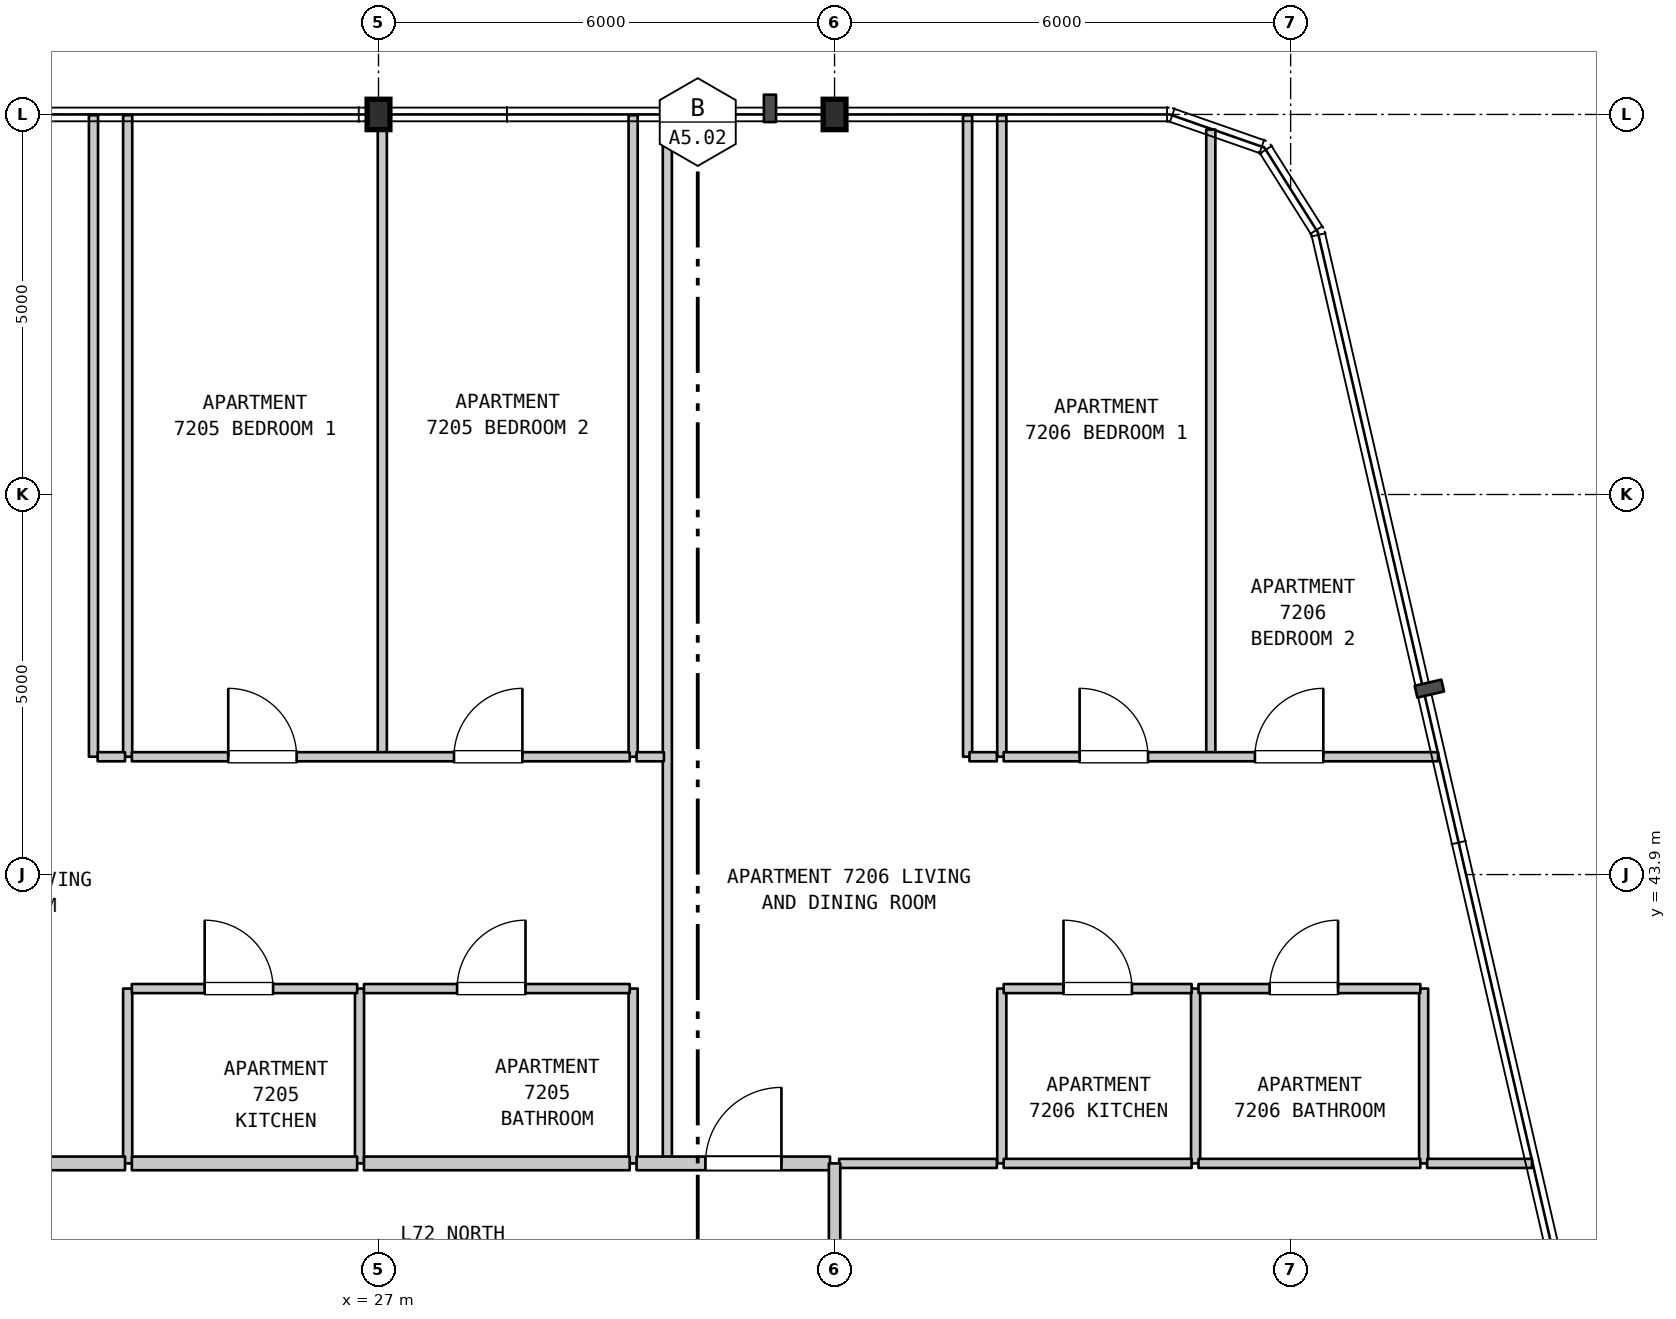
"""IFC4 building model, lengths in metres.
Left out: names, types, materials, properties, quantities, classifications, styles, units other than length and angle.
Written with IfcOpenShell. Run it as: python <this file> out.ifc"""

import sys

from ifc_helpers import new_model, si_unit, direction, frame, frame_2d, origin, origin_2d, place, context, subcontext, project, spatial, rectangle, i_section, extrude, element, fill, save


model = new_model("IFC4")
c1 = context("Model", 3, precision=1e-05, world=origin(), true_north=direction((0.0, 1.0)))
c2 = subcontext(c1, "Body", "Model", "MODEL_VIEW")
j1 = project(units=[si_unit("LENGTHUNIT", "METRE"), si_unit("PLANEANGLEUNIT", "RADIAN")], contexts=[c1])
p1 = place(None, origin())
s1 = spatial("IfcSite", under=j1, at=p1, CompositionType="ELEMENT")
p2 = place(p1, origin())
s2 = spatial("IfcBuilding", under=s1, at=p2, CompositionType="ELEMENT")
p3 = place(p2, frame((0.0, 0.0, 288.0)))
s3 = spatial("IfcBuildingStorey", under=s2, at=p3, CompositionType="ELEMENT", Elevation=288.0)
for number, where, z_axis, x_axis in (
    (1, (27.0, 53.9, 0.0), (0.0, 0.0, 1.0), (1.0, 0.0, 0.0)),
    (2, (33.0, 53.9, 0.0), (0.0, 0.0, 1.0), (1.0, 0.0, 0.0)),
):
    element("IfcColumn", number, at=place(p3, frame(where, z_axis=z_axis, x_axis=x_axis)), inside=s3, PredefinedType="COLUMN", context=c2, shape_type="SweptSolid", body=[
        extrude(i_section(OverallWidth=0.3, OverallDepth=0.4, WebThickness=0.013, FlangeThickness=0.024, FilletRadius=0.027, at=origin_2d()), origin(), (0.0, 0.0, 1.0), 3.7),
    ])
p4 = place(p3, frame((23.25, 45.45, 0.0), z_axis=(0.0, 0.0, 1.0), x_axis=(0.0, 1.0, 0.0)))
e3 = element("IfcWall", 3, at=p4, inside=s3, PredefinedType="PARTITIONING", context=c2, shape_type="SweptSolid", body=[
    extrude(rectangle(XDim=8.44, YDim=0.12, at=frame_2d((4.22, 0.0))), origin(), (0.0, 0.0, 1.0), 3.39),
])
p5 = place(p3, frame((23.7, 40.1, 0.0), z_axis=(0.0, 0.0, 1.0), x_axis=(0.0, 1.0, 0.0)))
e4 = element("IfcWall", 4, at=p5, inside=s3, PredefinedType="PARTITIONING", context=c2, shape_type="SweptSolid", body=[
    extrude(rectangle(XDim=2.3, YDim=0.12, at=frame_2d((1.15, 0.0))), origin(), (0.0, 0.0, 1.0), 3.39),
])
p6 = place(p3, frame((23.7, 45.45, 0.0), z_axis=(0.0, 0.0, 1.0), x_axis=(0.0, 1.0, 0.0)))
e5 = element("IfcWall", 5, at=p6, inside=s3, PredefinedType="PARTITIONING", context=c2, shape_type="SweptSolid", body=[
    extrude(rectangle(XDim=8.44, YDim=0.12, at=frame_2d((4.22, 0.0))), origin(), (0.0, 0.0, 1.0), 3.39),
])
p7 = place(p3, frame((26.75, 40.1, 0.0), z_axis=(0.0, 0.0, 1.0), x_axis=(0.0, 1.0, 0.0)))
e6 = element("IfcWall", 6, at=p7, inside=s3, PredefinedType="PARTITIONING", context=c2, shape_type="SweptSolid", body=[
    extrude(rectangle(XDim=2.3, YDim=0.12, at=frame_2d((1.15, 0.0))), origin(), (0.0, 0.0, 1.0), 3.39),
])
p8 = place(p3, frame((27.05, 45.45, 0.0), z_axis=(0.0, 0.0, 1.0), x_axis=(0.0, 1.0, 0.0)))
e7 = element("IfcWall", 7, at=p8, inside=s3, PredefinedType="PARTITIONING", context=c2, shape_type="SweptSolid", body=[
    extrude(rectangle(XDim=8.44, YDim=0.12, at=frame_2d((4.22, 0.0))), origin(), (0.0, 0.0, 1.0), 3.15),
])
p9 = place(p3, frame((30.35, 40.1, 0.0), z_axis=(0.0, 0.0, 1.0), x_axis=(0.0, 1.0, 0.0)))
e8 = element("IfcWall", 8, at=p9, inside=s3, PredefinedType="PARTITIONING", context=c2, shape_type="SweptSolid", body=[
    extrude(rectangle(XDim=2.3, YDim=0.12, at=frame_2d((1.15, 0.0))), origin(), (0.0, 0.0, 1.0), 3.39),
])
p10 = place(p3, frame((30.35, 45.45, 0.0), z_axis=(0.0, 0.0, 1.0), x_axis=(0.0, 1.0, 0.0)))
e9 = element("IfcWall", 9, at=p10, inside=s3, PredefinedType="PARTITIONING", context=c2, shape_type="SweptSolid", body=[
    extrude(rectangle(XDim=8.44, YDim=0.12, at=frame_2d((4.22, 0.0))), origin(), (0.0, 0.0, 1.0), 3.39),
])
p11 = place(p3, frame((30.8, 40.1, 0.0), z_axis=(0.0, 0.0, 1.0), x_axis=(0.0, 1.0, 0.0)))
e10 = element("IfcWall", 10, at=p11, inside=s3, PredefinedType="PARTITIONING", context=c2, shape_type="SweptSolid", body=[
    extrude(rectangle(XDim=13.79, YDim=0.12, at=frame_2d((6.895, 0.0))), origin(), (0.0, 0.0, 1.0), 3.39),
])
p12 = place(p3, frame((34.75, 45.45, 0.0), z_axis=(0.0, 0.0, 1.0), x_axis=(0.0, 1.0, 0.0)))
e11 = element("IfcWall", 11, at=p12, inside=s3, PredefinedType="PARTITIONING", context=c2, shape_type="SweptSolid", body=[
    extrude(rectangle(XDim=8.44, YDim=0.12, at=frame_2d((4.22, 0.0))), origin(), (0.0, 0.0, 1.0), 3.39),
])
p13 = place(p3, frame((35.2, 40.1, 0.0), z_axis=(0.0, 0.0, 1.0), x_axis=(0.0, 1.0, 0.0)))
e12 = element("IfcWall", 12, at=p13, inside=s3, PredefinedType="PARTITIONING", context=c2, shape_type="SweptSolid", body=[
    extrude(rectangle(XDim=2.3, YDim=0.12, at=frame_2d((1.15, 0.0))), origin(), (0.0, 0.0, 1.0), 3.39),
])
p14 = place(p3, frame((35.2, 45.45, 0.0), z_axis=(0.0, 0.0, 1.0), x_axis=(0.0, 1.0, 0.0)))
e13 = element("IfcWall", 13, at=p14, inside=s3, PredefinedType="PARTITIONING", context=c2, shape_type="SweptSolid", body=[
    extrude(rectangle(XDim=8.44, YDim=0.12, at=frame_2d((4.22, 0.0))), origin(), (0.0, 0.0, 1.0), 3.39),
])
p15 = place(p3, frame((37.75, 40.1, 0.0), z_axis=(0.0, 0.0, 1.0), x_axis=(0.0, 1.0, 0.0)))
e14 = element("IfcWall", 14, at=p15, inside=s3, PredefinedType="PARTITIONING", context=c2, shape_type="SweptSolid", body=[
    extrude(rectangle(XDim=2.3, YDim=0.12, at=frame_2d((1.15, 0.0))), origin(), (0.0, 0.0, 1.0), 3.39),
])
p16 = place(p3, frame((37.95, 45.45, 0.0), z_axis=(0.0, 0.0, 1.0), x_axis=(0.0, 1.0, 0.0)))
e15 = element("IfcWall", 15, at=p16, inside=s3, PredefinedType="PARTITIONING", context=c2, shape_type="SweptSolid", body=[
    extrude(rectangle(XDim=8.251, YDim=0.12, at=frame_2d((4.125, 0.0))), origin(), (0.0, 0.0, 1.0), 3.39),
])
p17 = place(p3, frame((40.75, 40.1, 0.0), z_axis=(0.0, 0.0, 1.0), x_axis=(0.0, 1.0, 0.0)))
e16 = element("IfcWall", 16, at=p17, inside=s3, PredefinedType="PARTITIONING", context=c2, shape_type="SweptSolid", body=[
    extrude(rectangle(XDim=2.3, YDim=0.12, at=frame_2d((1.15, 0.0))), origin(), (0.0, 0.0, 1.0), 3.39),
])
p18 = place(p3, frame((19.245, 40.1, 0.0), z_axis=(0.0, 0.0, 1.0), x_axis=(1.0, 0.0, 0.0)))
e17 = element("IfcWall", 17, at=p18, inside=s3, PredefinedType="STANDARD", context=c2, shape_type="SweptSolid", body=[
    extrude(rectangle(XDim=4.42, YDim=0.18, at=frame_2d((2.21, 0.0))), origin(), (0.0, 0.0, 1.0), 3.39),
])
p19 = place(p18, frame((1.638, 0.0, 0.0)))
e18 = element("IfcOpeningElement", 18, at=p19, cuts=e17, PredefinedType="OPENING", context=c2, shape_type="SweptSolid", body=[
    extrude(rectangle(XDim=1.0, YDim=2.15, at=frame_2d((0.5, 1.075))), frame((0.0, 0.1, 0.0), z_axis=(0.0, -1.0, 0.0), x_axis=(1.0, 0.0, 0.0)), (0.0, 0.0, 1.0), 0.2),
])
p20 = place(p3, frame((23.755, 40.1, 0.0), z_axis=(0.0, 0.0, 1.0), x_axis=(1.0, 0.0, 0.0)))
e19 = element("IfcWall", 19, at=p20, inside=s3, PredefinedType="STANDARD", context=c2, shape_type="SweptSolid", body=[
    extrude(rectangle(XDim=2.964, YDim=0.18, at=frame_2d((1.482, 0.0))), origin(), (0.0, 0.0, 1.0), 3.39),
])
p21 = place(p3, frame((26.809, 40.1, 0.0), z_axis=(0.0, 0.0, 1.0), x_axis=(1.0, 0.0, 0.0)))
e20 = element("IfcWall", 20, at=p21, inside=s3, PredefinedType="STANDARD", context=c2, shape_type="SweptSolid", body=[
    extrude(rectangle(XDim=3.496, YDim=0.18, at=frame_2d((1.748, 0.0))), origin(), (0.0, 0.0, 1.0), 3.39),
])
p22 = place(p3, frame((30.395, 40.1, 0.0), z_axis=(0.0, 0.0, 1.0), x_axis=(1.0, 0.0, 0.0)))
e21 = element("IfcWall", 21, at=p22, inside=s3, PredefinedType="STANDARD", context=c2, shape_type="SweptSolid", body=[
    extrude(rectangle(XDim=2.545, YDim=0.18, at=frame_2d((1.272, 0.0))), origin(), (0.0, 0.0, 1.0), 3.39),
])
p23 = place(p22, frame((0.906, 0.0, 0.0)))
e22 = element("IfcOpeningElement", 22, at=p23, cuts=e21, PredefinedType="OPENING", context=c2, shape_type="SweptSolid", body=[
    extrude(rectangle(XDim=1.0, YDim=2.15, at=frame_2d((0.5, 1.075))), frame((0.0, 0.1, 0.0), z_axis=(0.0, -1.0, 0.0), x_axis=(1.0, 0.0, 0.0)), (0.0, 0.0, 1.0), 0.2),
])
p24 = place(p3, frame((33.06, 40.1, 0.0), z_axis=(0.0, 0.0, 1.0), x_axis=(1.0, 0.0, 0.0)))
e23 = element("IfcWall", 23, at=p24, inside=s3, PredefinedType="PARTITIONING", context=c2, shape_type="SweptSolid", body=[
    extrude(rectangle(XDim=2.075, YDim=0.12, at=frame_2d((1.038, 0.0))), origin(), (0.0, 0.0, 1.0), 3.39),
])
p25 = place(p3, frame((35.225, 40.1, 0.0), z_axis=(0.0, 0.0, 1.0), x_axis=(1.0, 0.0, 0.0)))
e24 = element("IfcWall", 24, at=p25, inside=s3, PredefinedType="PARTITIONING", context=c2, shape_type="SweptSolid", body=[
    extrude(rectangle(XDim=2.473, YDim=0.12, at=frame_2d((1.236, 0.0))), origin(), (0.0, 0.0, 1.0), 3.39),
])
p26 = place(p3, frame((37.788, 40.1, 0.0), z_axis=(0.0, 0.0, 1.0), x_axis=(1.0, 0.0, 0.0)))
e25 = element("IfcWall", 25, at=p26, inside=s3, PredefinedType="PARTITIONING", context=c2, shape_type="SweptSolid", body=[
    extrude(rectangle(XDim=2.918, YDim=0.12, at=frame_2d((1.459, 0.0))), origin(), (0.0, 0.0, 1.0), 3.39),
])
p27 = place(p3, frame((40.796, 40.1, 0.0), z_axis=(0.0, 0.0, 1.0), x_axis=(1.0, 0.0, 0.0)))
e26 = element("IfcWall", 26, at=p27, inside=s3, PredefinedType="PARTITIONING", context=c2, shape_type="SweptSolid", body=[
    extrude(rectangle(XDim=1.379, YDim=0.12, at=frame_2d((0.689, 0.0))), origin(), (0.0, 0.0, 1.0), 3.39),
])
p28 = place(p3, frame((23.755, 42.4, 0.0), z_axis=(0.0, 0.0, 1.0), x_axis=(1.0, 0.0, 0.0)))
e27 = element("IfcWall", 27, at=p28, inside=s3, PredefinedType="PARTITIONING", context=c2, shape_type="SweptSolid", body=[
    extrude(rectangle(XDim=2.964, YDim=0.12, at=frame_2d((1.482, 0.0))), origin(), (0.0, 0.0, 1.0), 3.39),
])
p29 = place(p28, frame((0.958, 0.0, 0.0)))
e28 = element("IfcOpeningElement", 28, at=p29, cuts=e27, PredefinedType="OPENING", context=c2, shape_type="SweptSolid", body=[
    extrude(rectangle(XDim=0.9, YDim=2.15, at=frame_2d((0.45, 1.075))), frame((0.0, 0.07, 0.0), z_axis=(0.0, -1.0, 0.0), x_axis=(1.0, 0.0, 0.0)), (0.0, 0.0, 1.0), 0.14),
])
p30 = place(p3, frame((26.809, 42.4, 0.0), z_axis=(0.0, 0.0, 1.0), x_axis=(1.0, 0.0, 0.0)))
e29 = element("IfcWall", 29, at=p30, inside=s3, PredefinedType="PARTITIONING", context=c2, shape_type="SweptSolid", body=[
    extrude(rectangle(XDim=3.496, YDim=0.12, at=frame_2d((1.748, 0.0))), origin(), (0.0, 0.0, 1.0), 3.39),
])
p31 = place(p30, frame((1.225, 0.0, 0.0)))
e30 = element("IfcOpeningElement", 30, at=p31, cuts=e29, PredefinedType="OPENING", context=c2, shape_type="SweptSolid", body=[
    extrude(rectangle(XDim=0.9, YDim=2.1, at=frame_2d((0.45, 1.05))), frame((0.0, 0.07, 0.0), z_axis=(0.0, -1.0, 0.0), x_axis=(1.0, 0.0, 0.0)), (0.0, 0.0, 1.0), 0.14),
])
p32 = place(p3, frame((35.225, 42.4, 0.0), z_axis=(0.0, 0.0, 1.0), x_axis=(1.0, 0.0, 0.0)))
e31 = element("IfcWall", 31, at=p32, inside=s3, PredefinedType="PARTITIONING", context=c2, shape_type="SweptSolid", body=[
    extrude(rectangle(XDim=2.473, YDim=0.12, at=frame_2d((1.236, 0.0))), origin(), (0.0, 0.0, 1.0), 3.39),
])
p33 = place(p32, frame((0.787, 0.0, 0.0)))
e32 = element("IfcOpeningElement", 32, at=p33, cuts=e31, PredefinedType="OPENING", context=c2, shape_type="SweptSolid", body=[
    extrude(rectangle(XDim=0.9, YDim=2.15, at=frame_2d((0.45, 1.075))), frame((0.0, 0.07, 0.0), z_axis=(0.0, -1.0, 0.0), x_axis=(1.0, 0.0, 0.0)), (0.0, 0.0, 1.0), 0.14),
])
p34 = place(p3, frame((37.788, 42.4, 0.0), z_axis=(0.0, 0.0, 1.0), x_axis=(1.0, 0.0, 0.0)))
e33 = element("IfcWall", 33, at=p34, inside=s3, PredefinedType="PARTITIONING", context=c2, shape_type="SweptSolid", body=[
    extrude(rectangle(XDim=2.918, YDim=0.12, at=frame_2d((1.459, 0.0))), origin(), (0.0, 0.0, 1.0), 3.39),
])
p35 = place(p34, frame((0.936, 0.0, 0.0)))
e34 = element("IfcOpeningElement", 34, at=p35, cuts=e33, PredefinedType="OPENING", context=c2, shape_type="SweptSolid", body=[
    extrude(rectangle(XDim=0.9, YDim=2.1, at=frame_2d((0.45, 1.05))), frame((0.0, 0.07, 0.0), z_axis=(0.0, -1.0, 0.0), x_axis=(1.0, 0.0, 0.0)), (0.0, 0.0, 1.0), 0.14),
])
p36 = place(p3, frame((23.305, 45.45, 0.0), z_axis=(0.0, 0.0, 1.0), x_axis=(1.0, 0.0, 0.0)))
e35 = element("IfcWall", 35, at=p36, inside=s3, PredefinedType="PARTITIONING", context=c2, shape_type="SweptSolid", body=[
    extrude(rectangle(XDim=0.36, YDim=0.12, at=frame_2d((0.18, 0.0))), origin(), (0.0, 0.0, 1.0), 3.39),
])
p37 = place(p3, frame((23.755, 45.45, 0.0), z_axis=(0.0, 0.0, 1.0), x_axis=(1.0, 0.0, 0.0)))
e36 = element("IfcWall", 36, at=p37, inside=s3, PredefinedType="PARTITIONING", context=c2, shape_type="SweptSolid", body=[
    extrude(rectangle(XDim=6.55, YDim=0.12, at=frame_2d((3.275, 0.0))), origin(), (0.0, 0.0, 1.0), 3.39),
])
p38 = place(p37, frame((1.268, 0.0, 0.0)))
e37 = element("IfcOpeningElement", 37, at=p38, cuts=e36, PredefinedType="OPENING", context=c2, shape_type="SweptSolid", body=[
    extrude(rectangle(XDim=0.9, YDim=2.15, at=frame_2d((0.45, 1.075))), frame((0.0, 0.07, 0.0), z_axis=(0.0, -1.0, 0.0), x_axis=(1.0, 0.0, 0.0)), (0.0, 0.0, 1.0), 0.14),
])
p39 = place(p37, frame((4.238, 0.0, 0.0)))
e38 = element("IfcOpeningElement", 38, at=p39, cuts=e36, PredefinedType="OPENING", context=c2, shape_type="SweptSolid", body=[
    extrude(rectangle(XDim=0.9, YDim=2.15, at=frame_2d((0.45, 1.075))), frame((0.0, 0.07, 0.0), z_axis=(0.0, -1.0, 0.0), x_axis=(1.0, 0.0, 0.0)), (0.0, 0.0, 1.0), 0.14),
])
p40 = place(p3, frame((30.395, 45.45, 0.0), z_axis=(0.0, 0.0, 1.0), x_axis=(1.0, 0.0, 0.0)))
e39 = element("IfcWall", 39, at=p40, inside=s3, PredefinedType="PARTITIONING", context=c2, shape_type="SweptSolid", body=[
    extrude(rectangle(XDim=0.36, YDim=0.12, at=frame_2d((0.18, 0.0))), origin(), (0.0, 0.0, 1.0), 3.39),
])
p41 = place(p3, frame((34.775, 45.45, 0.0), z_axis=(0.0, 0.0, 1.0), x_axis=(1.0, 0.0, 0.0)))
e40 = element("IfcWall", 40, at=p41, inside=s3, PredefinedType="PARTITIONING", context=c2, shape_type="SweptSolid", body=[
    extrude(rectangle(XDim=0.36, YDim=0.12, at=frame_2d((0.18, 0.0))), origin(), (0.0, 0.0, 1.0), 3.39),
])
p42 = place(p3, frame((35.225, 45.45, 0.0), z_axis=(0.0, 0.0, 1.0), x_axis=(1.0, 0.0, 0.0)))
e41 = element("IfcWall", 41, at=p42, inside=s3, PredefinedType="PARTITIONING", context=c2, shape_type="SweptSolid", body=[
    extrude(rectangle(XDim=5.715, YDim=0.12, at=frame_2d((2.857, 0.0))), origin(), (0.0, 0.0, 1.0), 3.39),
])
p43 = place(p42, frame((0.999, 0.0, 0.0)))
e42 = element("IfcOpeningElement", 42, at=p43, cuts=e41, PredefinedType="OPENING", context=c2, shape_type="SweptSolid", body=[
    extrude(rectangle(XDim=0.9, YDim=2.15, at=frame_2d((0.45, 1.075))), frame((0.0, 0.07, 0.0), z_axis=(0.0, -1.0, 0.0), x_axis=(1.0, 0.0, 0.0)), (0.0, 0.0, 1.0), 0.14),
])
p44 = place(p42, frame((3.305, 0.0, 0.0)))
e43 = element("IfcOpeningElement", 43, at=p44, cuts=e41, PredefinedType="OPENING", context=c2, shape_type="SweptSolid", body=[
    extrude(rectangle(XDim=0.9, YDim=2.15, at=frame_2d((0.45, 1.075))), frame((0.0, 0.07, 0.0), z_axis=(0.0, -1.0, 0.0), x_axis=(1.0, 0.0, 0.0)), (0.0, 0.0, 1.0), 0.14),
])
p45 = place(p3, frame((33.0, 37.9, 0.0), z_axis=(0.0, 0.0, 1.0), x_axis=(0.0, 1.0, 0.0)))
e44 = element("IfcWall", 44, at=p45, inside=s3, PredefinedType="STANDARD", context=c2, shape_type="SweptSolid", body=[
    extrude(rectangle(XDim=2.2, YDim=0.15, at=frame_2d((1.1, 0.0))), origin(), (0.0, 0.0, 1.0), 2.79),
])
p46 = place(p23, origin())
e45 = element("IfcDoor", 45, at=p46, inside=s3, OperationType="SINGLE_SWING_RIGHT", PredefinedType="DOOR", context=c2, shape_type="SweptSolid", body=[
    extrude(rectangle(XDim=1.0, YDim=2.15, at=frame_2d((0.5, 1.075))), frame((0.0, 0.025, 0.0), z_axis=(0.0, -1.0, 0.0), x_axis=(1.0, 0.0, 0.0)), (0.0, 0.0, 1.0), 0.05),
])
fill(e22, e45)
p47 = place(p29, origin())
e46 = element("IfcDoor", 46, at=p47, inside=s3, OperationType="SINGLE_SWING_LEFT", PredefinedType="DOOR", context=c2, shape_type="SweptSolid", body=[
    extrude(rectangle(XDim=0.9, YDim=2.15, at=frame_2d((0.45, 1.075))), frame((0.0, 0.025, 0.0), z_axis=(0.0, -1.0, 0.0), x_axis=(1.0, 0.0, 0.0)), (0.0, 0.0, 1.0), 0.05),
])
fill(e28, e46)
p48 = place(p31, origin())
e47 = element("IfcDoor", 47, at=p48, inside=s3, OperationType="SINGLE_SWING_RIGHT", PredefinedType="DOOR", context=c2, shape_type="SweptSolid", body=[
    extrude(rectangle(XDim=0.9, YDim=2.1, at=frame_2d((0.45, 1.05))), frame((0.0, 0.025, 0.0), z_axis=(0.0, -1.0, 0.0), x_axis=(1.0, 0.0, 0.0)), (0.0, 0.0, 1.0), 0.05),
])
fill(e30, e47)
p49 = place(p33, origin())
e48 = element("IfcDoor", 48, at=p49, inside=s3, OperationType="SINGLE_SWING_LEFT", PredefinedType="DOOR", context=c2, shape_type="SweptSolid", body=[
    extrude(rectangle(XDim=0.9, YDim=2.15, at=frame_2d((0.45, 1.075))), frame((0.0, 0.025, 0.0), z_axis=(0.0, -1.0, 0.0), x_axis=(1.0, 0.0, 0.0)), (0.0, 0.0, 1.0), 0.05),
])
fill(e32, e48)
p50 = place(p35, origin())
e49 = element("IfcDoor", 49, at=p50, inside=s3, OperationType="SINGLE_SWING_RIGHT", PredefinedType="DOOR", context=c2, shape_type="SweptSolid", body=[
    extrude(rectangle(XDim=0.9, YDim=2.1, at=frame_2d((0.45, 1.05))), frame((0.0, 0.025, 0.0), z_axis=(0.0, -1.0, 0.0), x_axis=(1.0, 0.0, 0.0)), (0.0, 0.0, 1.0), 0.05),
])
fill(e34, e49)
p51 = place(p38, origin())
e50 = element("IfcDoor", 50, at=p51, inside=s3, OperationType="SINGLE_SWING_LEFT", PredefinedType="DOOR", context=c2, shape_type="SweptSolid", body=[
    extrude(rectangle(XDim=0.9, YDim=2.15, at=frame_2d((0.45, 1.075))), frame((0.0, 0.025, 0.0), z_axis=(0.0, -1.0, 0.0), x_axis=(1.0, 0.0, 0.0)), (0.0, 0.0, 1.0), 0.05),
])
fill(e37, e50)
p52 = place(p39, origin())
e51 = element("IfcDoor", 51, at=p52, inside=s3, OperationType="SINGLE_SWING_RIGHT", PredefinedType="DOOR", context=c2, shape_type="SweptSolid", body=[
    extrude(rectangle(XDim=0.9, YDim=2.15, at=frame_2d((0.45, 1.075))), frame((0.0, 0.025, 0.0), z_axis=(0.0, -1.0, 0.0), x_axis=(1.0, 0.0, 0.0)), (0.0, 0.0, 1.0), 0.05),
])
fill(e38, e51)
p53 = place(p43, origin())
e52 = element("IfcDoor", 52, at=p53, inside=s3, OperationType="SINGLE_SWING_LEFT", PredefinedType="DOOR", context=c2, shape_type="SweptSolid", body=[
    extrude(rectangle(XDim=0.9, YDim=2.15, at=frame_2d((0.45, 1.075))), frame((0.0, 0.025, 0.0), z_axis=(0.0, -1.0, 0.0), x_axis=(1.0, 0.0, 0.0)), (0.0, 0.0, 1.0), 0.05),
])
fill(e42, e52)
p54 = place(p44, origin())
e53 = element("IfcDoor", 53, at=p54, inside=s3, OperationType="SINGLE_SWING_RIGHT", PredefinedType="DOOR", context=c2, shape_type="SweptSolid", body=[
    extrude(rectangle(XDim=0.9, YDim=2.15, at=frame_2d((0.45, 1.075))), frame((0.0, 0.025, 0.0), z_axis=(0.0, -1.0, 0.0), x_axis=(1.0, 0.0, 0.0)), (0.0, 0.0, 1.0), 0.05),
])
fill(e43, e53)
save(model, sys.argv[1])
